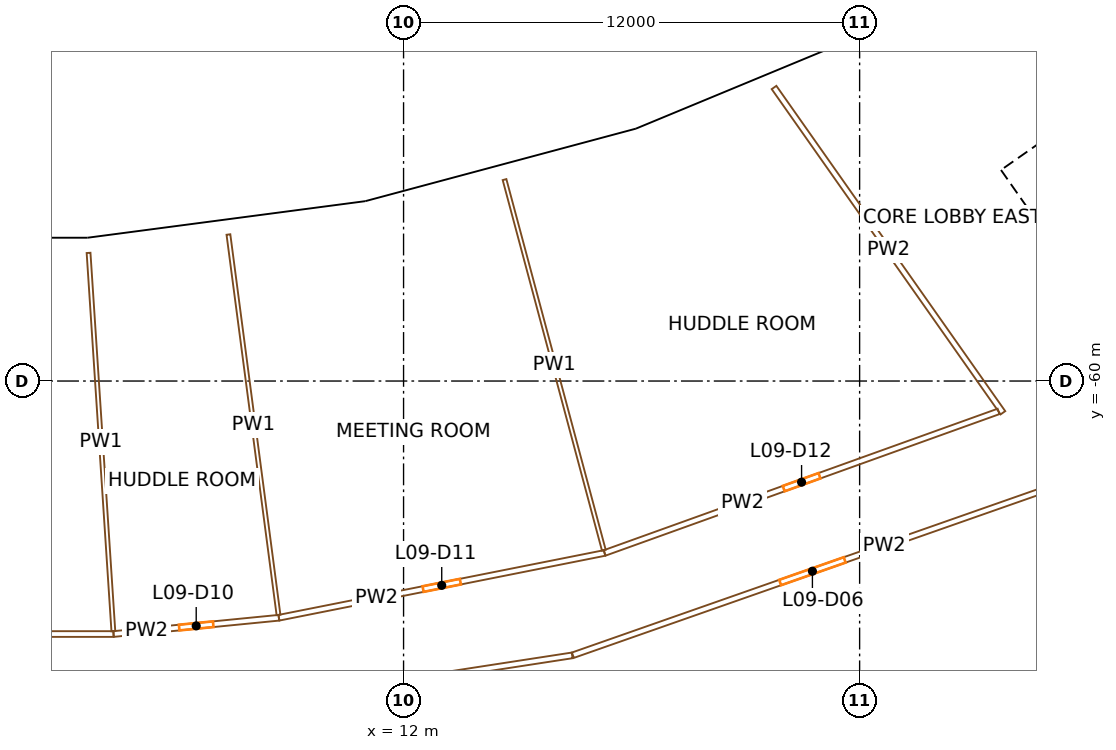
"""IFC4 building model, lengths in metres.
Left out: names, types, materials, properties, quantities, classifications, styles, units other than length and angle.
Written with IfcOpenShell. Run it as: python <this file> out.ifc"""

import sys

from ifc_helpers import new_model, si_unit, direction, frame, frame_2d, origin, origin_2d, place, context, subcontext, project, spatial, rectangle, extrude, element, fill, save


model = new_model("IFC4")
c1 = context("Model", 3, precision=1e-05, world=origin(), true_north=direction((0.0, 1.0)))
c2 = subcontext(c1, "Body", "Model", "MODEL_VIEW")
j1 = project(units=[si_unit("LENGTHUNIT", "METRE"), si_unit("PLANEANGLEUNIT", "RADIAN")], contexts=[c1])
p1 = place(None, origin())
s1 = spatial("IfcSite", under=j1, at=p1, CompositionType="ELEMENT")
p2 = place(p1, origin())
s2 = spatial("IfcBuilding", under=s1, at=p2, CompositionType="ELEMENT")
p3 = place(p2, frame((0.0, 0.0, 51.9)))
s3 = spatial("IfcBuildingStorey", under=s2, at=p3, CompositionType="ELEMENT", Elevation=51.9)
for number, where, z_axis, x_axis in (
    (1, (3.81, -58.125, 0.0), (0.0, 0.0, 1.0), (0.998, 0.065, 0.0)),
    (2, (11.364, -57.131, 0.0), (0.0, 0.0, 1.0), (0.981, 0.195, 0.0)),
    (3, (18.724, -55.159, 0.0), (0.0, 0.0, 1.0), (0.947, 0.321, 0.0)),
    (4, (25.763, -52.243, 0.0), (0.0, 0.0, 1.0), (0.897, 0.442, 0.0)),
):
    element("IfcColumn", number, at=place(p3, frame(where, z_axis=z_axis, x_axis=x_axis)), inside=s3, PredefinedType="COLUMN", context=c2, shape_type="SweptSolid", body=[
        extrude(rectangle(XDim=1.3, YDim=1.7, at=origin_2d()), origin(), (0.0, 0.0, 1.0), 3.8),
    ])
p4 = place(p3, frame((36.717, -66.337, 0.0), z_axis=(0.0, 0.0, 1.0), x_axis=(-0.573577477574, 0.819151315216, 0.0)))
e5 = element("IfcWall", 5, at=p4, inside=s3, PredefinedType="SHEAR", context=c2, shape_type="SweptSolid", body=[
    extrude(rectangle(XDim=14.8, YDim=0.9, at=frame_2d((7.4, 0.0))), origin(), (0.0, 0.0, 1.0), 3.5),
])
p5 = place(p4, frame((6.2, 0.0, 0.0)))
e6 = element("IfcOpeningElement", 6, at=p5, cuts=e5, PredefinedType="OPENING", context=c2, shape_type="SweptSolid", body=[
    extrude(rectangle(XDim=2.4, YDim=2.1, at=frame_2d((1.2, 1.05))), frame((0.0, 0.46, 0.0), z_axis=(0.0, -1.0, 0.0), x_axis=(1.0, 0.0, 0.0)), (0.0, 0.0, 1.0), 0.92),
])
p6 = place(p3, frame((28.854, -54.324, 0.0), z_axis=(0.0, 0.0, 1.0), x_axis=(0.819145767589, 0.573585400304, 0.0)))
e7 = element("IfcWall", 7, at=p6, inside=s3, PredefinedType="SHEAR", context=c2, shape_type="SweptSolid", body=[
    extrude(rectangle(XDim=15.045, YDim=0.9, at=frame_2d((7.523, 0.0))), origin(), (0.0, 0.0, 1.0), 3.5),
])
p7 = place(p6, frame((0.9, 0.0, 0.0)))
e8 = element("IfcOpeningElement", 8, at=p7, cuts=e7, PredefinedType="OPENING", context=c2, shape_type="SweptSolid", body=[
    extrude(rectangle(XDim=1.0, YDim=2.1, at=frame_2d((0.5, 1.05))), frame((0.0, 0.46, 0.0), z_axis=(0.0, -1.0, 0.0), x_axis=(1.0, 0.0, 0.0)), (0.0, 0.0, 1.0), 0.92),
])
p8 = place(p6, frame((4.975, 0.0, 0.0)))
e9 = element("IfcOpeningElement", 9, at=p8, cuts=e7, PredefinedType="OPENING", context=c2, shape_type="SweptSolid", body=[
    extrude(rectangle(XDim=0.9, YDim=2.1, at=frame_2d((0.45, 1.05))), frame((0.0, 0.46, 0.0), z_axis=(0.0, -1.0, 0.0), x_axis=(1.0, 0.0, 0.0)), (0.0, 0.0, 1.0), 0.92),
])
p9 = place(p6, frame((13.495, 0.0, 0.0)))
e10 = element("IfcOpeningElement", 10, at=p9, cuts=e7, PredefinedType="OPENING", context=c2, shape_type="SweptSolid", body=[
    extrude(rectangle(XDim=1.1, YDim=2.1, at=frame_2d((0.55, 1.05))), frame((0.0, 0.46, 0.0), z_axis=(0.0, -1.0, 0.0), x_axis=(1.0, 0.0, 0.0)), (0.0, 0.0, 1.0), 0.92),
])
p10 = place(p3, frame((18.202, -53.543, 0.0), z_axis=(0.0, 0.0, 1.0), x_axis=(-0.965924637935, -0.25882348006, 0.0)))
e11 = element("IfcWall", 11, at=p10, inside=s3, PredefinedType="SOLIDWALL", context=c2, shape_type="SweptSolid", body=[
    extrude(rectangle(XDim=7.447, YDim=0.4, at=frame_2d((3.724, 0.0))), origin(), (0.0, 0.0, 1.0), 2.7),
])
p11 = place(p10, frame((4.266, 0.0, 0.9)))
e12 = element("IfcOpeningElement", 12, at=p11, cuts=e11, PredefinedType="OPENING", context=c2, shape_type="SweptSolid", body=[
    extrude(rectangle(XDim=2.6, YDim=1.65, at=frame_2d((1.3, 0.825))), frame((0.0, 0.21, 0.0), z_axis=(0.0, -1.0, 0.0), x_axis=(1.0, 0.0, 0.0)), (0.0, 0.0, 1.0), 0.42),
])
p12 = place(p10, frame((0.581, 0.0, 0.9)))
e13 = element("IfcOpeningElement", 13, at=p12, cuts=e11, PredefinedType="OPENING", context=c2, shape_type="SweptSolid", body=[
    extrude(rectangle(XDim=2.6, YDim=1.65, at=frame_2d((1.3, 0.825))), frame((0.0, 0.21, 0.0), z_axis=(0.0, -1.0, 0.0), x_axis=(1.0, 0.0, 0.0)), (0.0, 0.0, 1.0), 0.42),
])
p13 = place(p3, frame((24.965, -50.738, 0.0), z_axis=(0.0, 0.0, 1.0), x_axis=(-0.923891626322, -0.382654234018, 0.0)))
e14 = element("IfcWall", 14, at=p13, inside=s3, PredefinedType="SOLIDWALL", context=c2, shape_type="SweptSolid", body=[
    extrude(rectangle(XDim=7.296, YDim=0.4, at=frame_2d((3.648, 0.0))), origin(), (0.0, 0.0, 1.0), 2.7),
])
p14 = place(p13, frame((4.191, 0.0, 0.9)))
e15 = element("IfcOpeningElement", 15, at=p14, cuts=e14, PredefinedType="OPENING", context=c2, shape_type="SweptSolid", body=[
    extrude(rectangle(XDim=2.6, YDim=1.65, at=frame_2d((1.3, 0.825))), frame((0.0, 0.21, 0.0), z_axis=(0.0, -1.0, 0.0), x_axis=(1.0, 0.0, 0.0)), (0.0, 0.0, 1.0), 0.42),
])
p15 = place(p13, frame((0.505, 0.0, 0.9)))
e16 = element("IfcOpeningElement", 16, at=p15, cuts=e14, PredefinedType="OPENING", context=c2, shape_type="SweptSolid", body=[
    extrude(rectangle(XDim=2.6, YDim=1.65, at=frame_2d((1.3, 0.825))), frame((0.0, 0.21, 0.0), z_axis=(0.0, -1.0, 0.0), x_axis=(1.0, 0.0, 0.0)), (0.0, 0.0, 1.0), 0.42),
])
p16 = place(p3, frame((3.724, -56.429, 0.0), z_axis=(0.0, 0.0, 1.0), x_axis=(-1.0, 0.0, 0.0)))
e17 = element("IfcWall", 17, at=p16, inside=s3, PredefinedType="SOLIDWALL", context=c2, shape_type="SweptSolid", body=[
    extrude(rectangle(XDim=7.447, YDim=0.4, at=frame_2d((3.724, 0.0))), origin(), (0.0, 0.0, 1.0), 2.7),
])
p17 = place(p16, frame((4.266, 0.0, 0.9)))
e18 = element("IfcOpeningElement", 18, at=p17, cuts=e17, PredefinedType="OPENING", context=c2, shape_type="SweptSolid", body=[
    extrude(rectangle(XDim=2.6, YDim=1.65, at=frame_2d((1.3, 0.825))), frame((0.0, 0.21, 0.0), z_axis=(0.0, -1.0, 0.0), x_axis=(1.0, 0.0, 0.0)), (0.0, 0.0, 1.0), 0.42),
])
p18 = place(p16, frame((0.581, 0.0, 0.9)))
e19 = element("IfcOpeningElement", 19, at=p18, cuts=e17, PredefinedType="OPENING", context=c2, shape_type="SweptSolid", body=[
    extrude(rectangle(XDim=2.6, YDim=1.65, at=frame_2d((1.3, 0.825))), frame((0.0, 0.21, 0.0), z_axis=(0.0, -1.0, 0.0), x_axis=(1.0, 0.0, 0.0)), (0.0, 0.0, 1.0), 0.42),
])
p19 = place(p3, frame((10.982, -55.47, 0.0), z_axis=(0.0, 0.0, 1.0), x_axis=(-0.99144746031, -0.130506449818, 0.0)))
e20 = element("IfcWall", 20, at=p19, inside=s3, PredefinedType="SOLIDWALL", context=c2, shape_type="SweptSolid", body=[
    extrude(rectangle(XDim=7.296, YDim=0.4, at=frame_2d((3.648, 0.0))), origin(), (0.0, 0.0, 1.0), 2.7),
])
p20 = place(p19, frame((4.191, 0.0, 0.9)))
e21 = element("IfcOpeningElement", 21, at=p20, cuts=e20, PredefinedType="OPENING", context=c2, shape_type="SweptSolid", body=[
    extrude(rectangle(XDim=2.6, YDim=1.65, at=frame_2d((1.3, 0.825))), frame((0.0, 0.21, 0.0), z_axis=(0.0, -1.0, 0.0), x_axis=(1.0, 0.0, 0.0)), (0.0, 0.0, 1.0), 0.42),
])
p21 = place(p19, frame((0.505, 0.0, 0.9)))
e22 = element("IfcOpeningElement", 22, at=p21, cuts=e20, PredefinedType="OPENING", context=c2, shape_type="SweptSolid", body=[
    extrude(rectangle(XDim=2.6, YDim=1.65, at=frame_2d((1.3, 0.825))), frame((0.0, 0.21, 0.0), z_axis=(0.0, -1.0, 0.0), x_axis=(1.0, 0.0, 0.0)), (0.0, 0.0, 1.0), 0.42),
])
p22 = place(p3, frame((-4.369, -66.657, 0.0), z_axis=(0.0, 0.0, 1.0), x_axis=(1.0, 0.0, 0.0)))
e23 = element("IfcWall", 23, at=p22, inside=s3, PredefinedType="PARTITIONING", context=c2, shape_type="SweptSolid", body=[
    extrude(rectangle(XDim=8.738, YDim=0.15, at=frame_2d((4.369, 0.0))), origin(), (0.0, 0.0, 1.0), 2.4),
])
p23 = place(p22, frame((3.869, 0.0, 0.0)))
e24 = element("IfcOpeningElement", 24, at=p23, cuts=e23, PredefinedType="OPENING", context=c2, shape_type="SweptSolid", body=[
    extrude(rectangle(XDim=1.0, YDim=2.1, at=frame_2d((0.5, 1.05))), frame((0.0, 0.085, 0.0), z_axis=(0.0, -1.0, 0.0), x_axis=(1.0, 0.0, 0.0)), (0.0, 0.0, 1.0), 0.17),
])
p24 = place(p3, frame((3.712, -56.628, 0.0), z_axis=(0.0, 0.0, 1.0), x_axis=(0.06539808502, -0.997859253841, 0.0)))
e25 = element("IfcWall", 25, at=p24, inside=s3, PredefinedType="PARTITIONING", context=c2, shape_type="SweptSolid", body=[
    extrude(rectangle(XDim=9.975, YDim=0.1, at=frame_2d((4.987, 0.0))), origin(), (0.0, 0.0, 1.0), 2.4),
])
p25 = place(p3, frame((4.369, -66.657, 0.0), z_axis=(0.0, 0.0, 1.0), x_axis=(0.995184826457, 0.098016127192, 0.0)))
e26 = element("IfcWall", 26, at=p25, inside=s3, PredefinedType="PARTITIONING", context=c2, shape_type="SweptSolid", body=[
    extrude(rectangle(XDim=4.371, YDim=0.15, at=frame_2d((2.186, 0.0))), origin(), (0.0, 0.0, 1.0), 2.4),
])
p26 = place(p25, frame((1.736, 0.0, 0.0)))
e27 = element("IfcOpeningElement", 27, at=p26, cuts=e26, PredefinedType="OPENING", context=c2, shape_type="SweptSolid", body=[
    extrude(rectangle(XDim=0.9, YDim=2.1, at=frame_2d((0.45, 1.05))), frame((0.0, 0.085, 0.0), z_axis=(0.0, -1.0, 0.0), x_axis=(1.0, 0.0, 0.0)), (0.0, 0.0, 1.0), 0.17),
])
p27 = place(p3, frame((4.526, -69.052, 0.0), z_axis=(0.0, 0.0, 1.0), x_axis=(0.988363732991, 0.152108945522, 0.0)))
e28 = element("IfcWall", 28, at=p27, inside=s3, PredefinedType="PARTITIONING", context=c2, shape_type="SweptSolid", body=[
    extrude(rectangle(XDim=12.051, YDim=0.15, at=frame_2d((6.025, 0.0))), origin(), (0.0, 0.0, 1.0), 2.4),
])
p28 = place(p3, frame((7.392, -56.145, 0.0), z_axis=(0.0, 0.0, 1.0), x_axis=(0.130538336764, -0.991443262439, 0.0)))
e29 = element("IfcWall", 29, at=p28, inside=s3, PredefinedType="PARTITIONING", context=c2, shape_type="SweptSolid", body=[
    extrude(rectangle(XDim=10.096, YDim=0.1, at=frame_2d((5.048, 0.0))), origin(), (0.0, 0.0, 1.0), 2.4),
])
p29 = place(p3, frame((8.719, -66.229, 0.0), z_axis=(0.0, 0.0, 1.0), x_axis=(0.980786466832, 0.195084357342, 0.0)))
e30 = element("IfcWall", 30, at=p29, inside=s3, PredefinedType="PARTITIONING", context=c2, shape_type="SweptSolid", body=[
    extrude(rectangle(XDim=8.738, YDim=0.15, at=frame_2d((4.369, 0.0))), origin(), (0.0, 0.0, 1.0), 2.4),
])
p30 = place(p29, frame((3.869, 0.0, 0.0)))
e31 = element("IfcOpeningElement", 31, at=p30, cuts=e30, PredefinedType="OPENING", context=c2, shape_type="SweptSolid", body=[
    extrude(rectangle(XDim=1.0, YDim=2.1, at=frame_2d((0.5, 1.05))), frame((0.0, 0.085, 0.0), z_axis=(0.0, -1.0, 0.0), x_axis=(1.0, 0.0, 0.0)), (0.0, 0.0, 1.0), 0.17),
])
p31 = place(p3, frame((14.657, -54.7, 0.0), z_axis=(0.0, 0.0, 1.0), x_axis=(0.258825935876, -0.965923979885, 0.0)))
e32 = element("IfcWall", 32, at=p31, inside=s3, PredefinedType="PARTITIONING", context=c2, shape_type="SweptSolid", body=[
    extrude(rectangle(XDim=10.096, YDim=0.1, at=frame_2d((5.048, 0.0))), origin(), (0.0, 0.0, 1.0), 2.4),
])
p32 = place(p3, frame((29.06, -62.794, 0.0), z_axis=(0.0, 0.0, 1.0), x_axis=(-0.943672989474, -0.330879568631, 0.0)))
e33 = element("IfcWall", 33, at=p32, inside=s3, PredefinedType="PARTITIONING", context=c2, shape_type="SweptSolid", body=[
    extrude(rectangle(XDim=13.357, YDim=0.15, at=frame_2d((6.679, 0.0))), origin(), (0.0, 0.0, 1.0), 2.4),
])
p33 = place(p32, frame((5.779, 0.0, 0.0)))
e34 = element("IfcOpeningElement", 34, at=p33, cuts=e33, PredefinedType="OPENING", context=c2, shape_type="SweptSolid", body=[
    extrude(rectangle(XDim=1.8, YDim=2.1, at=frame_2d((0.9, 1.05))), frame((0.0, 0.085, 0.0), z_axis=(0.0, -1.0, 0.0), x_axis=(1.0, 0.0, 0.0)), (0.0, 0.0, 1.0), 0.17),
])
p34 = place(p3, frame((17.289, -64.524, 0.0), z_axis=(0.0, 0.0, 1.0), x_axis=(0.941106453562, 0.338110400705, 0.0)))
e35 = element("IfcWall", 35, at=p34, inside=s3, PredefinedType="PARTITIONING", context=c2, shape_type="SweptSolid", body=[
    extrude(rectangle(XDim=11.016, YDim=0.15, at=frame_2d((5.508, 0.0))), origin(), (0.0, 0.0, 1.0), 2.4),
])
p35 = place(p34, frame((5.008, 0.0, 0.0)))
e36 = element("IfcOpeningElement", 36, at=p35, cuts=e35, PredefinedType="OPENING", context=c2, shape_type="SweptSolid", body=[
    extrude(rectangle(XDim=1.0, YDim=2.1, at=frame_2d((0.5, 1.05))), frame((0.0, 0.085, 0.0), z_axis=(0.0, -1.0, 0.0), x_axis=(1.0, 0.0, 0.0)), (0.0, 0.0, 1.0), 0.17),
])
p36 = place(p3, frame((21.748, -52.276, 0.0), z_axis=(0.0, 0.0, 1.0), x_axis=(0.575419434668, -0.817858468322, 0.0)))
e37 = element("IfcWall", 37, at=p36, inside=s3, PredefinedType="PARTITIONING", context=c2, shape_type="SweptSolid", body=[
    extrude(rectangle(XDim=10.465, YDim=0.15, at=frame_2d((5.232, 0.0))), origin(), (0.0, 0.0, 1.0), 2.4),
])
p37 = place(p18, origin())
e38 = element("IfcWindow", 38, at=p37, inside=s3, PartitioningType="SINGLE_PANEL", PredefinedType="WINDOW", context=c2, shape_type="SweptSolid", body=[
    extrude(rectangle(XDim=2.6, YDim=1.65, at=frame_2d((1.3, 0.825))), frame((0.0, 0.03, 0.0), z_axis=(0.0, -1.0, 0.0), x_axis=(1.0, 0.0, 0.0)), (0.0, 0.0, 1.0), 0.06),
])
fill(e19, e38)
p38 = place(p20, origin())
e39 = element("IfcWindow", 39, at=p38, inside=s3, PartitioningType="SINGLE_PANEL", PredefinedType="WINDOW", context=c2, shape_type="SweptSolid", body=[
    extrude(rectangle(XDim=2.6, YDim=1.65, at=frame_2d((1.3, 0.825))), frame((0.0, 0.03, 0.0), z_axis=(0.0, -1.0, 0.0), x_axis=(1.0, 0.0, 0.0)), (0.0, 0.0, 1.0), 0.06),
])
fill(e21, e39)
p39 = place(p21, origin())
e40 = element("IfcWindow", 40, at=p39, inside=s3, PartitioningType="SINGLE_PANEL", PredefinedType="WINDOW", context=c2, shape_type="SweptSolid", body=[
    extrude(rectangle(XDim=2.6, YDim=1.65, at=frame_2d((1.3, 0.825))), frame((0.0, 0.03, 0.0), z_axis=(0.0, -1.0, 0.0), x_axis=(1.0, 0.0, 0.0)), (0.0, 0.0, 1.0), 0.06),
])
fill(e22, e40)
p40 = place(p11, origin())
e41 = element("IfcWindow", 41, at=p40, inside=s3, PartitioningType="SINGLE_PANEL", PredefinedType="WINDOW", context=c2, shape_type="SweptSolid", body=[
    extrude(rectangle(XDim=2.6, YDim=1.65, at=frame_2d((1.3, 0.825))), frame((0.0, 0.03, 0.0), z_axis=(0.0, -1.0, 0.0), x_axis=(1.0, 0.0, 0.0)), (0.0, 0.0, 1.0), 0.06),
])
fill(e12, e41)
p41 = place(p12, origin())
e42 = element("IfcWindow", 42, at=p41, inside=s3, PartitioningType="SINGLE_PANEL", PredefinedType="WINDOW", context=c2, shape_type="SweptSolid", body=[
    extrude(rectangle(XDim=2.6, YDim=1.65, at=frame_2d((1.3, 0.825))), frame((0.0, 0.03, 0.0), z_axis=(0.0, -1.0, 0.0), x_axis=(1.0, 0.0, 0.0)), (0.0, 0.0, 1.0), 0.06),
])
fill(e13, e42)
p42 = place(p14, origin())
e43 = element("IfcWindow", 43, at=p42, inside=s3, PartitioningType="SINGLE_PANEL", PredefinedType="WINDOW", context=c2, shape_type="SweptSolid", body=[
    extrude(rectangle(XDim=2.6, YDim=1.65, at=frame_2d((1.3, 0.825))), frame((0.0, 0.03, 0.0), z_axis=(0.0, -1.0, 0.0), x_axis=(1.0, 0.0, 0.0)), (0.0, 0.0, 1.0), 0.06),
])
fill(e15, e43)
p43 = place(p15, origin())
e44 = element("IfcWindow", 44, at=p43, inside=s3, PartitioningType="SINGLE_PANEL", PredefinedType="WINDOW", context=c2, shape_type="SweptSolid", body=[
    extrude(rectangle(XDim=2.6, YDim=1.65, at=frame_2d((1.3, 0.825))), frame((0.0, 0.03, 0.0), z_axis=(0.0, -1.0, 0.0), x_axis=(1.0, 0.0, 0.0)), (0.0, 0.0, 1.0), 0.06),
])
fill(e16, e44)
p44 = place(p33, origin())
e45 = element("IfcDoor", 45, at=p44, inside=s3, OperationType="DOUBLE_DOOR_SINGLE_SWING", PredefinedType="DOOR", context=c2, shape_type="SweptSolid", body=[
    extrude(rectangle(XDim=1.8, YDim=2.1, at=frame_2d((0.9, 1.05))), frame((0.0, 0.025, 0.0), z_axis=(0.0, -1.0, 0.0), x_axis=(1.0, 0.0, 0.0)), (0.0, 0.0, 1.0), 0.05),
])
fill(e34, e45)
p45 = place(p26, origin())
e46 = element("IfcDoor", 46, at=p45, inside=s3, OperationType="SINGLE_SWING_RIGHT", PredefinedType="DOOR", context=c2, shape_type="SweptSolid", body=[
    extrude(rectangle(XDim=0.9, YDim=2.1, at=frame_2d((0.45, 1.05))), frame((0.0, 0.025, 0.0), z_axis=(0.0, -1.0, 0.0), x_axis=(1.0, 0.0, 0.0)), (0.0, 0.0, 1.0), 0.05),
])
fill(e27, e46)
p46 = place(p30, origin())
e47 = element("IfcDoor", 47, at=p46, inside=s3, OperationType="SINGLE_SWING_RIGHT", PredefinedType="DOOR", context=c2, shape_type="SweptSolid", body=[
    extrude(rectangle(XDim=1.0, YDim=2.1, at=frame_2d((0.5, 1.05))), frame((0.0, 0.025, 0.0), z_axis=(0.0, -1.0, 0.0), x_axis=(1.0, 0.0, 0.0)), (0.0, 0.0, 1.0), 0.05),
])
fill(e31, e47)
p47 = place(p35, origin())
e48 = element("IfcDoor", 48, at=p47, inside=s3, OperationType="SINGLE_SWING_RIGHT", PredefinedType="DOOR", context=c2, shape_type="SweptSolid", body=[
    extrude(rectangle(XDim=1.0, YDim=2.1, at=frame_2d((0.5, 1.05))), frame((0.0, 0.025, 0.0), z_axis=(0.0, -1.0, 0.0), x_axis=(1.0, 0.0, 0.0)), (0.0, 0.0, 1.0), 0.05),
])
fill(e36, e48)
save(model, sys.argv[1])
